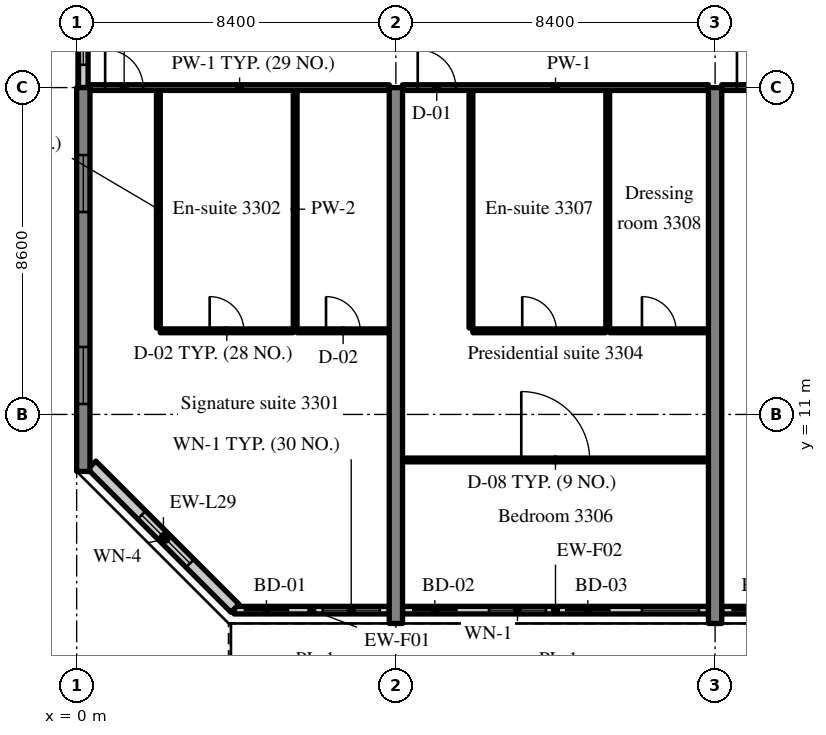
"""IFC4 building model, lengths in metres.
Left out: names, types, materials, properties, quantities, classifications, styles, units other than length and angle.
Written with IfcOpenShell. Run it as: python <this file> out.ifc"""

import sys

from ifc_helpers import new_model, si_unit, direction, frame, frame_2d, origin, place, context, subcontext, project, spatial, rectangle, extrude, source, transform, mapped, element, fill, save


model = new_model("IFC4")
c1 = context("Model", 3, precision=1e-05, world=origin(), true_north=direction((0.0, 1.0)))
c2 = subcontext(c1, "Body", "Model", "MODEL_VIEW")
j1 = project(units=[si_unit("LENGTHUNIT", "METRE"), si_unit("PLANEANGLEUNIT", "RADIAN")], contexts=[c1])
p1 = place(None, origin())
s1 = spatial("IfcSite", under=j1, at=p1, CompositionType="ELEMENT")
p2 = place(p1, origin())
s2 = spatial("IfcBuilding", under=s1, at=p2, CompositionType="ELEMENT")
p3 = place(p2, frame((0.0, 0.0, 137.0)))
s3 = spatial("IfcBuildingStorey", under=s2, at=p3, CompositionType="ELEMENT", Elevation=137.0)
m1 = source(origin(), c2, "Body", "SweptSolid", [
    extrude(rectangle(XDim=10.1, YDim=0.35, at=frame_2d((5.05, 0.0))), origin(), (0.0, 0.0, 1.0), 3.52),
])
p4 = place(p3, frame((0.175, 9.5, 0.0), z_axis=(0.0, 0.0, 1.0), x_axis=(0.0, 1.0, 0.0)))
e1 = element("IfcWall", 1, at=p4, inside=s3, PredefinedType="SHEAR", context=c2, shape_type="MappedRepresentation", body=[
    mapped(m1, transform((0.0, 0.0, 0.0), scale=1.0)),
])
m2 = source(origin(), c2, "Body", "SweptSolid", [
    extrude(rectangle(XDim=1.5, YDim=1.5, at=frame_2d((0.75, 0.75))), frame((0.0, 0.185, 0.0), z_axis=(0.0, -1.0, 0.0), x_axis=(1.0, 0.0, 0.0)), (0.0, 0.0, 1.0), 0.37),
])
p5 = place(p4, frame((1.775, 0.0, 0.9)))
e2 = element("IfcOpeningElement", 2, at=p5, cuts=e1, PredefinedType="OPENING", context=c2, shape_type="MappedRepresentation", body=[
    mapped(m2, transform((0.0, 0.0, 0.0), scale=1.0)),
])
p6 = place(p4, frame((6.825, 0.0, 0.9)))
e3 = element("IfcOpeningElement", 3, at=p6, cuts=e1, PredefinedType="OPENING", context=c2, shape_type="MappedRepresentation", body=[
    mapped(m2, transform((0.0, 0.0, 0.0), scale=1.0)),
])
m3 = source(origin(), c2, "Body", "SweptSolid", [
    extrude(rectangle(XDim=14.1, YDim=0.35, at=frame_2d((7.05, 0.0))), origin(), (0.0, 0.0, 1.0), 3.52),
])
for number, where, z_axis, x_axis in (
    (4, (8.4, 5.5, 0.0), (0.0, 0.0, 1.0), (0.0, 1.0, 0.0)),
    (5, (16.8, 5.5, 0.0), (0.0, 0.0, 1.0), (0.0, 1.0, 0.0)),
):
    element("IfcWall", number, at=place(p3, frame(where, z_axis=z_axis, x_axis=x_axis)), inside=s3, PredefinedType="SHEAR", context=c2, shape_type="MappedRepresentation", body=[
        mapped(m3, transform((0.0, 0.0, 0.0), scale=1.0)),
    ])
m4 = source(origin(), c2, "Body", "SweptSolid", [
    extrude(rectangle(XDim=4.08, YDim=0.2, at=frame_2d((2.04, 0.0))), origin(), (0.0, 0.0, 1.0), 2.82),
])
p7 = place(p3, frame((4.145, 5.85, 0.0), z_axis=(0.0, 0.0, 1.0), x_axis=(1.0, 0.0, 0.0)))
e6 = element("IfcWall", 6, at=p7, inside=s3, PredefinedType="SOLIDWALL", context=c2, shape_type="MappedRepresentation", body=[
    mapped(m4, transform((0.0, 0.0, 0.0), scale=1.0)),
])
m5 = source(origin(), c2, "Body", "SweptSolid", [
    extrude(rectangle(XDim=1.2, YDim=2.4, at=frame_2d((0.6, 1.2))), frame((0.0, 0.11, 0.0), z_axis=(0.0, -1.0, 0.0), x_axis=(1.0, 0.0, 0.0)), (0.0, 0.0, 1.0), 0.22),
])
p8 = place(p7, frame((0.25, 0.0, 0.0)))
e7 = element("IfcOpeningElement", 7, at=p8, cuts=e6, PredefinedType="OPENING", context=c2, shape_type="MappedRepresentation", body=[
    mapped(m5, transform((0.0, 0.0, 0.0), scale=1.0)),
])
m6 = source(origin(), c2, "Body", "SweptSolid", [
    extrude(rectangle(XDim=1.5, YDim=1.5, at=frame_2d((0.75, 0.75))), frame((0.0, 0.11, 0.0), z_axis=(0.0, -1.0, 0.0), x_axis=(1.0, 0.0, 0.0)), (0.0, 0.0, 1.0), 0.22),
])
p9 = place(p7, frame((2.33, 0.0, 0.9)))
e8 = element("IfcOpeningElement", 8, at=p9, cuts=e6, PredefinedType="OPENING", context=c2, shape_type="MappedRepresentation", body=[
    mapped(m6, transform((0.0, 0.0, 0.0), scale=1.0)),
])
m7 = source(origin(), c2, "Body", "SweptSolid", [
    extrude(rectangle(XDim=8.05, YDim=0.2, at=frame_2d((4.025, 0.0))), origin(), (0.0, 0.0, 1.0), 2.82),
])
p10 = place(p3, frame((8.575, 5.85, 0.0), z_axis=(0.0, 0.0, 1.0), x_axis=(1.0, 0.0, 0.0)))
e9 = element("IfcWall", 9, at=p10, inside=s3, PredefinedType="SOLIDWALL", context=c2, shape_type="MappedRepresentation", body=[
    mapped(m7, transform((0.0, 0.0, 0.0), scale=1.0)),
])
p11 = place(p10, frame((0.25, 0.0, 0.0)))
e10 = element("IfcOpeningElement", 10, at=p11, cuts=e9, PredefinedType="OPENING", context=c2, shape_type="MappedRepresentation", body=[
    mapped(m5, transform((0.0, 0.0, 0.0), scale=1.0)),
])
p12 = place(p10, frame((2.275, 0.0, 0.9)))
e11 = element("IfcOpeningElement", 11, at=p12, cuts=e9, PredefinedType="OPENING", context=c2, shape_type="MappedRepresentation", body=[
    mapped(m6, transform((0.0, 0.0, 0.0), scale=1.0)),
])
p13 = place(p10, frame((4.275, 0.0, 0.0)))
e12 = element("IfcOpeningElement", 12, at=p13, cuts=e9, PredefinedType="OPENING", context=c2, shape_type="MappedRepresentation", body=[
    mapped(m5, transform((0.0, 0.0, 0.0), scale=1.0)),
])
p14 = place(p10, frame((6.3, 0.0, 0.9)))
e13 = element("IfcOpeningElement", 13, at=p14, cuts=e9, PredefinedType="OPENING", context=c2, shape_type="MappedRepresentation", body=[
    mapped(m6, transform((0.0, 0.0, 0.0), scale=1.0)),
])
m8 = source(origin(), c2, "Body", "SweptSolid", [
    extrude(rectangle(XDim=8.05, YDim=0.2, at=frame_2d((4.025, 0.0))), origin(), (0.0, 0.0, 1.0), 2.82),
])
p15 = place(p3, frame((16.975, 5.85, 0.0), z_axis=(0.0, 0.0, 1.0), x_axis=(1.0, 0.0, 0.0)))
e14 = element("IfcWall", 14, at=p15, inside=s3, PredefinedType="SOLIDWALL", context=c2, shape_type="MappedRepresentation", body=[
    mapped(m8, transform((0.0, 0.0, 0.0), scale=1.0)),
])
p16 = place(p15, frame((0.25, 0.0, 0.0)))
e15 = element("IfcOpeningElement", 15, at=p16, cuts=e14, PredefinedType="OPENING", context=c2, shape_type="MappedRepresentation", body=[
    mapped(m5, transform((0.0, 0.0, 0.0), scale=1.0)),
])
p17 = place(p15, frame((2.275, 0.0, 0.9)))
e16 = element("IfcOpeningElement", 16, at=p17, cuts=e14, PredefinedType="OPENING", context=c2, shape_type="MappedRepresentation", body=[
    mapped(m6, transform((0.0, 0.0, 0.0), scale=1.0)),
])
p18 = place(p15, frame((4.275, 0.0, 0.0)))
e17 = element("IfcOpeningElement", 17, at=p18, cuts=e14, PredefinedType="OPENING", context=c2, shape_type="MappedRepresentation", body=[
    mapped(m5, transform((0.0, 0.0, 0.0), scale=1.0)),
])
p19 = place(p15, frame((6.3, 0.0, 0.9)))
e18 = element("IfcOpeningElement", 18, at=p19, cuts=e14, PredefinedType="OPENING", context=c2, shape_type="MappedRepresentation", body=[
    mapped(m6, transform((0.0, 0.0, 0.0), scale=1.0)),
])
m9 = source(origin(), c2, "Body", "SweptSolid", [
    extrude(rectangle(XDim=5.326, YDim=0.3, at=frame_2d((2.663, 0.0))), origin(), (0.0, 0.0, 1.0), 3.52),
])
p20 = place(p3, frame((0.4, 9.666, 0.0), z_axis=(0.0, 0.0, 1.0), x_axis=(0.707106781187, -0.707106781187, 0.0)))
e19 = element("IfcWall", 19, at=p20, inside=s3, PredefinedType="SOLIDWALL", context=c2, shape_type="MappedRepresentation", body=[
    mapped(m9, transform((0.0, 0.0, 0.0), scale=1.0)),
])
m10 = source(origin(), c2, "Body", "SweptSolid", [
    extrude(rectangle(XDim=1.8, YDim=1.5, at=frame_2d((0.9, 0.75))), frame((0.0, 0.16, 0.0), z_axis=(0.0, -1.0, 0.0), x_axis=(1.0, 0.0, 0.0)), (0.0, 0.0, 1.0), 0.32),
])
p21 = place(p20, frame((1.854, 0.0, 0.9)))
e20 = element("IfcOpeningElement", 20, at=p21, cuts=e19, PredefinedType="OPENING", context=c2, shape_type="MappedRepresentation", body=[
    mapped(m10, transform((0.0, 0.0, 0.0), scale=1.0)),
])
m11 = source(origin(), c2, "Body", "SweptSolid", [
    extrude(rectangle(XDim=2.4, YDim=0.25, at=frame_2d((1.2, 0.0))), origin(), (0.0, 0.0, 1.0), 2.62),
])
p22 = place(p3, frame((0.175, 19.6, 0.0), z_axis=(0.0, 0.0, 1.0), x_axis=(0.0, 1.0, 0.0)))
e21 = element("IfcWall", 21, at=p22, inside=s3, PredefinedType="SOLIDWALL", context=c2, shape_type="MappedRepresentation", body=[
    mapped(m11, transform((0.0, 0.0, 0.0), scale=1.0)),
])
m12 = source(origin(), c2, "Body", "SweptSolid", [
    extrude(rectangle(XDim=1.2, YDim=1.5, at=frame_2d((0.6, 0.75))), frame((0.0, 0.135, 0.0), z_axis=(0.0, -1.0, 0.0), x_axis=(1.0, 0.0, 0.0)), (0.0, 0.0, 1.0), 0.27),
])
p23 = place(p22, frame((0.6, 0.0, 0.9)))
e22 = element("IfcOpeningElement", 22, at=p23, cuts=e21, PredefinedType="OPENING", context=c2, shape_type="MappedRepresentation", body=[
    mapped(m12, transform((0.0, 0.0, 0.0), scale=1.0)),
])
m13 = source(origin(), c2, "Body", "SweptSolid", [
    extrude(rectangle(XDim=6.25, YDim=0.1, at=frame_2d((3.125, 0.0))), origin(), (0.0, 0.0, 1.0), 3.52),
])
for number, where, z_axis, x_axis in (
    (23, (2.15, 13.275, 0.0), (0.0, 0.0, 1.0), (0.0, 1.0, 0.0)),
    (24, (5.75, 13.275, 0.0), (0.0, 0.0, 1.0), (0.0, 1.0, 0.0)),
):
    element("IfcWall", number, at=place(p3, frame(where, z_axis=z_axis, x_axis=x_axis)), inside=s3, PredefinedType="PARTITIONING", context=c2, shape_type="MappedRepresentation", body=[
        mapped(m13, transform((0.0, 0.0, 0.0), scale=1.0)),
    ])
m14 = source(origin(), c2, "Body", "SweptSolid", [
    extrude(rectangle(XDim=3.5, YDim=0.1, at=frame_2d((1.75, 0.0))), origin(), (0.0, 0.0, 1.0), 3.52),
])
p24 = place(p3, frame((2.2, 13.2, 0.0), z_axis=(0.0, 0.0, 1.0), x_axis=(1.0, 0.0, 0.0)))
e25 = element("IfcWall", 25, at=p24, inside=s3, PredefinedType="PARTITIONING", context=c2, shape_type="MappedRepresentation", body=[
    mapped(m14, transform((0.0, 0.0, 0.0), scale=1.0)),
])
m15 = source(origin(), c2, "Body", "SweptSolid", [
    extrude(rectangle(XDim=0.9, YDim=2.1, at=frame_2d((0.45, 1.05))), frame((0.0, 0.06, 0.0), z_axis=(0.0, -1.0, 0.0), x_axis=(1.0, 0.0, 0.0)), (0.0, 0.0, 1.0), 0.12),
])
p25 = place(p24, frame((1.3, 0.0, 0.0)))
e26 = element("IfcOpeningElement", 26, at=p25, cuts=e25, PredefinedType="OPENING", context=c2, shape_type="MappedRepresentation", body=[
    mapped(m15, transform((0.0, 0.0, 0.0), scale=1.0)),
])
m16 = source(origin(), c2, "Body", "SweptSolid", [
    extrude(rectangle(XDim=2.425, YDim=0.1, at=frame_2d((1.212, 0.0))), origin(), (0.0, 0.0, 1.0), 3.52),
])
p26 = place(p3, frame((5.8, 13.2, 0.0), z_axis=(0.0, 0.0, 1.0), x_axis=(1.0, 0.0, 0.0)))
e27 = element("IfcWall", 27, at=p26, inside=s3, PredefinedType="PARTITIONING", context=c2, shape_type="MappedRepresentation", body=[
    mapped(m16, transform((0.0, 0.0, 0.0), scale=1.0)),
])
p27 = place(p26, frame((0.762, 0.0, 0.0)))
e28 = element("IfcOpeningElement", 28, at=p27, cuts=e27, PredefinedType="OPENING", context=c2, shape_type="MappedRepresentation", body=[
    mapped(m15, transform((0.0, 0.0, 0.0), scale=1.0)),
])
m17 = source(origin(), c2, "Body", "SweptSolid", [
    extrude(rectangle(XDim=7.875, YDim=0.15, at=frame_2d((3.938, 0.0))), origin(), (0.0, 0.0, 1.0), 2.82),
])
p28 = place(p3, frame((0.35, 19.6, 0.0), z_axis=(0.0, 0.0, 1.0), x_axis=(1.0, 0.0, 0.0)))
e29 = element("IfcWall", 29, at=p28, inside=s3, PredefinedType="PARTITIONING", context=c2, shape_type="MappedRepresentation", body=[
    mapped(m17, transform((0.0, 0.0, 0.0), scale=1.0)),
])
m18 = source(origin(), c2, "Body", "SweptSolid", [
    extrude(rectangle(XDim=1.0, YDim=2.1, at=frame_2d((0.5, 1.05))), frame((0.0, 0.085, 0.0), z_axis=(0.0, -1.0, 0.0), x_axis=(1.0, 0.0, 0.0)), (0.0, 0.0, 1.0), 0.17),
])
p29 = place(p28, frame((0.4, 0.0, 0.0)))
e30 = element("IfcOpeningElement", 30, at=p29, cuts=e29, PredefinedType="OPENING", context=c2, shape_type="MappedRepresentation", body=[
    mapped(m18, transform((0.0, 0.0, 0.0), scale=1.0)),
])
for number, where, z_axis, x_axis in (
    (31, (10.375, 13.275, 0.0), (0.0, 0.0, 1.0), (0.0, 1.0, 0.0)),
    (32, (13.975, 13.275, 0.0), (0.0, 0.0, 1.0), (0.0, 1.0, 0.0)),
):
    element("IfcWall", number, at=place(p3, frame(where, z_axis=z_axis, x_axis=x_axis)), inside=s3, PredefinedType="PARTITIONING", context=c2, shape_type="MappedRepresentation", body=[
        mapped(m13, transform((0.0, 0.0, 0.0), scale=1.0)),
    ])
p30 = place(p3, frame((10.425, 13.2, 0.0), z_axis=(0.0, 0.0, 1.0), x_axis=(1.0, 0.0, 0.0)))
e33 = element("IfcWall", 33, at=p30, inside=s3, PredefinedType="PARTITIONING", context=c2, shape_type="MappedRepresentation", body=[
    mapped(m14, transform((0.0, 0.0, 0.0), scale=1.0)),
])
p31 = place(p30, frame((1.3, 0.0, 0.0)))
e34 = element("IfcOpeningElement", 34, at=p31, cuts=e33, PredefinedType="OPENING", context=c2, shape_type="MappedRepresentation", body=[
    mapped(m15, transform((0.0, 0.0, 0.0), scale=1.0)),
])
m19 = source(origin(), c2, "Body", "SweptSolid", [
    extrude(rectangle(XDim=2.6, YDim=0.1, at=frame_2d((1.3, 0.0))), origin(), (0.0, 0.0, 1.0), 3.52),
])
p32 = place(p3, frame((14.025, 13.2, 0.0), z_axis=(0.0, 0.0, 1.0), x_axis=(1.0, 0.0, 0.0)))
e35 = element("IfcWall", 35, at=p32, inside=s3, PredefinedType="PARTITIONING", context=c2, shape_type="MappedRepresentation", body=[
    mapped(m19, transform((0.0, 0.0, 0.0), scale=1.0)),
])
p33 = place(p32, frame((0.85, 0.0, 0.0)))
e36 = element("IfcOpeningElement", 36, at=p33, cuts=e35, PredefinedType="OPENING", context=c2, shape_type="MappedRepresentation", body=[
    mapped(m15, transform((0.0, 0.0, 0.0), scale=1.0)),
])
m20 = source(origin(), c2, "Body", "SweptSolid", [
    extrude(rectangle(XDim=8.05, YDim=0.1, at=frame_2d((4.025, 0.0))), origin(), (0.0, 0.0, 1.0), 3.52),
])
p34 = place(p3, frame((8.575, 9.802, 0.0), z_axis=(0.0, 0.0, 1.0), x_axis=(1.0, 0.0, 0.0)))
e37 = element("IfcWall", 37, at=p34, inside=s3, PredefinedType="PARTITIONING", context=c2, shape_type="MappedRepresentation", body=[
    mapped(m20, transform((0.0, 0.0, 0.0), scale=1.0)),
])
m21 = source(origin(), c2, "Body", "SweptSolid", [
    extrude(rectangle(XDim=1.8, YDim=2.1, at=frame_2d((0.9, 1.05))), frame((0.0, 0.06, 0.0), z_axis=(0.0, -1.0, 0.0), x_axis=(1.0, 0.0, 0.0)), (0.0, 0.0, 1.0), 0.12),
])
p35 = place(p34, frame((3.125, 0.0, 0.0)))
e38 = element("IfcOpeningElement", 38, at=p35, cuts=e37, PredefinedType="OPENING", context=c2, shape_type="MappedRepresentation", body=[
    mapped(m21, transform((0.0, 0.0, 0.0), scale=1.0)),
])
m22 = source(origin(), c2, "Body", "SweptSolid", [
    extrude(rectangle(XDim=8.05, YDim=0.15, at=frame_2d((4.025, 0.0))), origin(), (0.0, 0.0, 1.0), 2.82),
])
p36 = place(p3, frame((8.575, 19.6, 0.0), z_axis=(0.0, 0.0, 1.0), x_axis=(1.0, 0.0, 0.0)))
e39 = element("IfcWall", 39, at=p36, inside=s3, PredefinedType="PARTITIONING", context=c2, shape_type="MappedRepresentation", body=[
    mapped(m22, transform((0.0, 0.0, 0.0), scale=1.0)),
])
p37 = place(p36, frame((0.4, 0.0, 0.0)))
e40 = element("IfcOpeningElement", 40, at=p37, cuts=e39, PredefinedType="OPENING", context=c2, shape_type="MappedRepresentation", body=[
    mapped(m18, transform((0.0, 0.0, 0.0), scale=1.0)),
])
m23 = source(origin(), c2, "Body", "SweptSolid", [
    extrude(rectangle(XDim=8.05, YDim=0.15, at=frame_2d((4.025, 0.0))), origin(), (0.0, 0.0, 1.0), 2.82),
])
p38 = place(p3, frame((16.975, 19.6, 0.0), z_axis=(0.0, 0.0, 1.0), x_axis=(1.0, 0.0, 0.0)))
e41 = element("IfcWall", 41, at=p38, inside=s3, PredefinedType="PARTITIONING", context=c2, shape_type="MappedRepresentation", body=[
    mapped(m23, transform((0.0, 0.0, 0.0), scale=1.0)),
])
p39 = place(p38, frame((0.4, 0.0, 0.0)))
e42 = element("IfcOpeningElement", 42, at=p39, cuts=e41, PredefinedType="OPENING", context=c2, shape_type="MappedRepresentation", body=[
    mapped(m18, transform((0.0, 0.0, 0.0), scale=1.0)),
])
m24 = source(origin(), c2, "Body", "SweptSolid", [
    extrude(rectangle(XDim=1.2, YDim=2.4, at=frame_2d((0.6, 1.2))), frame((0.0, 0.025, 0.0), z_axis=(0.0, -1.0, 0.0), x_axis=(1.0, 0.0, 0.0)), (0.0, 0.0, 1.0), 0.05),
])
p40 = place(p8, origin())
e43 = element("IfcDoor", 43, at=p40, inside=s3, OperationType="SLIDING_TO_LEFT", PredefinedType="DOOR", context=c2, shape_type="MappedRepresentation", body=[
    mapped(m24, transform((0.0, 0.0, 0.0), scale=1.0)),
])
fill(e7, e43)
m25 = source(origin(), c2, "Body", "SweptSolid", [
    extrude(rectangle(XDim=1.5, YDim=1.5, at=frame_2d((0.75, 0.75))), frame((0.0, 0.03, 0.0), z_axis=(0.0, -1.0, 0.0), x_axis=(1.0, 0.0, 0.0)), (0.0, 0.0, 1.0), 0.06),
])
p41 = place(p9, origin())
e44 = element("IfcWindow", 44, at=p41, inside=s3, PartitioningType="SINGLE_PANEL", PredefinedType="WINDOW", context=c2, shape_type="MappedRepresentation", body=[
    mapped(m25, transform((0.0, 0.0, 0.0), scale=1.0)),
])
fill(e8, e44)
p42 = place(p11, origin())
e45 = element("IfcDoor", 45, at=p42, inside=s3, OperationType="SLIDING_TO_RIGHT", PredefinedType="DOOR", context=c2, shape_type="MappedRepresentation", body=[
    mapped(m24, transform((0.0, 0.0, 0.0), scale=1.0)),
])
fill(e10, e45)
p43 = place(p12, origin())
e46 = element("IfcWindow", 46, at=p43, inside=s3, PartitioningType="SINGLE_PANEL", PredefinedType="WINDOW", context=c2, shape_type="MappedRepresentation", body=[
    mapped(m25, transform((0.0, 0.0, 0.0), scale=1.0)),
])
fill(e11, e46)
p44 = place(p13, origin())
e47 = element("IfcDoor", 47, at=p44, inside=s3, OperationType="SLIDING_TO_LEFT", PredefinedType="DOOR", context=c2, shape_type="MappedRepresentation", body=[
    mapped(m24, transform((0.0, 0.0, 0.0), scale=1.0)),
])
fill(e12, e47)
p45 = place(p14, origin())
e48 = element("IfcWindow", 48, at=p45, inside=s3, PartitioningType="SINGLE_PANEL", PredefinedType="WINDOW", context=c2, shape_type="MappedRepresentation", body=[
    mapped(m25, transform((0.0, 0.0, 0.0), scale=1.0)),
])
fill(e13, e48)
p46 = place(p16, origin())
e49 = element("IfcDoor", 49, at=p46, inside=s3, OperationType="SLIDING_TO_RIGHT", PredefinedType="DOOR", context=c2, shape_type="MappedRepresentation", body=[
    mapped(m24, transform((0.0, 0.0, 0.0), scale=1.0)),
])
fill(e15, e49)
m26 = source(origin(), c2, "Body", "SweptSolid", [
    extrude(rectangle(XDim=1.8, YDim=1.5, at=frame_2d((0.9, 0.75))), frame((0.0, 0.03, 0.0), z_axis=(0.0, -1.0, 0.0), x_axis=(1.0, 0.0, 0.0)), (0.0, 0.0, 1.0), 0.06),
])
p47 = place(p21, origin())
e50 = element("IfcWindow", 50, at=p47, inside=s3, PartitioningType="SINGLE_PANEL", PredefinedType="WINDOW", context=c2, shape_type="MappedRepresentation", body=[
    mapped(m26, transform((0.0, 0.0, 0.0), scale=1.0)),
])
fill(e20, e50)
p48 = place(p5, origin())
e51 = element("IfcWindow", 51, at=p48, inside=s3, PartitioningType="SINGLE_PANEL", PredefinedType="WINDOW", context=c2, shape_type="MappedRepresentation", body=[
    mapped(m25, transform((0.0, 0.0, 0.0), scale=1.0)),
])
fill(e2, e51)
p49 = place(p6, origin())
e52 = element("IfcWindow", 52, at=p49, inside=s3, PartitioningType="SINGLE_PANEL", PredefinedType="WINDOW", context=c2, shape_type="MappedRepresentation", body=[
    mapped(m25, transform((0.0, 0.0, 0.0), scale=1.0)),
])
fill(e3, e52)
m27 = source(origin(), c2, "Body", "SweptSolid", [
    extrude(rectangle(XDim=1.2, YDim=1.5, at=frame_2d((0.6, 0.75))), frame((0.0, 0.03, 0.0), z_axis=(0.0, -1.0, 0.0), x_axis=(1.0, 0.0, 0.0)), (0.0, 0.0, 1.0), 0.06),
])
p50 = place(p23, origin())
e53 = element("IfcWindow", 53, at=p50, inside=s3, PartitioningType="SINGLE_PANEL", PredefinedType="WINDOW", context=c2, shape_type="MappedRepresentation", body=[
    mapped(m27, transform((0.0, 0.0, 0.0), scale=1.0)),
])
fill(e22, e53)
m28 = source(origin(), c2, "Body", "SweptSolid", [
    extrude(rectangle(XDim=0.9, YDim=2.1, at=frame_2d((0.45, 1.05))), frame((0.0, 0.025, 0.0), z_axis=(0.0, -1.0, 0.0), x_axis=(1.0, 0.0, 0.0)), (0.0, 0.0, 1.0), 0.05),
])
p51 = place(p25, origin())
e54 = element("IfcDoor", 54, at=p51, inside=s3, OperationType="SINGLE_SWING_LEFT", PredefinedType="DOOR", context=c2, shape_type="MappedRepresentation", body=[
    mapped(m28, transform((0.0, 0.0, 0.0), scale=1.0)),
])
fill(e26, e54)
p52 = place(p27, origin())
e55 = element("IfcDoor", 55, at=p52, inside=s3, OperationType="SINGLE_SWING_LEFT", PredefinedType="DOOR", context=c2, shape_type="MappedRepresentation", body=[
    mapped(m28, transform((0.0, 0.0, 0.0), scale=1.0)),
])
fill(e28, e55)
m29 = source(origin(), c2, "Body", "SweptSolid", [
    extrude(rectangle(XDim=1.0, YDim=2.1, at=frame_2d((0.5, 1.05))), frame((0.0, 0.025, 0.0), z_axis=(0.0, -1.0, 0.0), x_axis=(1.0, 0.0, 0.0)), (0.0, 0.0, 1.0), 0.05),
])
p53 = place(p29, origin())
e56 = element("IfcDoor", 56, at=p53, inside=s3, OperationType="SINGLE_SWING_LEFT", PredefinedType="DOOR", context=c2, shape_type="MappedRepresentation", body=[
    mapped(m29, transform((0.0, 0.0, 0.0), scale=1.0)),
])
fill(e30, e56)
p54 = place(p31, origin())
e57 = element("IfcDoor", 57, at=p54, inside=s3, OperationType="SINGLE_SWING_LEFT", PredefinedType="DOOR", context=c2, shape_type="MappedRepresentation", body=[
    mapped(m28, transform((0.0, 0.0, 0.0), scale=1.0)),
])
fill(e34, e57)
p55 = place(p33, origin())
e58 = element("IfcDoor", 58, at=p55, inside=s3, OperationType="SINGLE_SWING_LEFT", PredefinedType="DOOR", context=c2, shape_type="MappedRepresentation", body=[
    mapped(m28, transform((0.0, 0.0, 0.0), scale=1.0)),
])
fill(e36, e58)
m30 = source(origin(), c2, "Body", "SweptSolid", [
    extrude(rectangle(XDim=1.8, YDim=2.1, at=frame_2d((0.9, 1.05))), frame((0.0, 0.025, 0.0), z_axis=(0.0, -1.0, 0.0), x_axis=(1.0, 0.0, 0.0)), (0.0, 0.0, 1.0), 0.05),
])
p56 = place(p35, origin())
e59 = element("IfcDoor", 59, at=p56, inside=s3, OperationType="DOUBLE_DOOR_SINGLE_SWING", PredefinedType="DOOR", context=c2, shape_type="MappedRepresentation", body=[
    mapped(m30, transform((0.0, 0.0, 0.0), scale=1.0)),
])
fill(e38, e59)
p57 = place(p37, origin())
e60 = element("IfcDoor", 60, at=p57, inside=s3, OperationType="SINGLE_SWING_LEFT", PredefinedType="DOOR", context=c2, shape_type="MappedRepresentation", body=[
    mapped(m29, transform((0.0, 0.0, 0.0), scale=1.0)),
])
fill(e40, e60)
p58 = place(p39, origin())
e61 = element("IfcDoor", 61, at=p58, inside=s3, OperationType="SINGLE_SWING_LEFT", PredefinedType="DOOR", context=c2, shape_type="MappedRepresentation", body=[
    mapped(m29, transform((0.0, 0.0, 0.0), scale=1.0)),
])
fill(e42, e61)
save(model, sys.argv[1])
